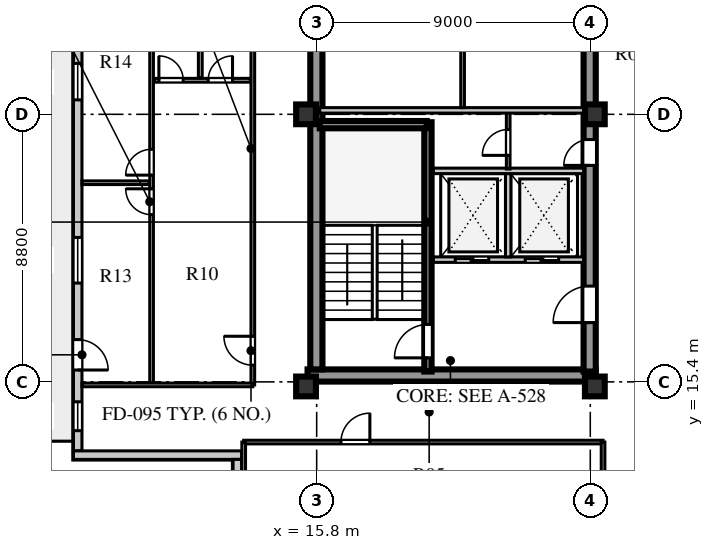
"""IFC4 building model, lengths in metres.
Left out: names, types, materials, properties, quantities, classifications, styles, units other than length and angle.
Written with IfcOpenShell. Run it as: python <this file> out.ifc"""

import sys

from ifc_helpers import new_model, si_unit, direction, frame, frame_2d, origin, origin_2d, place, context, subcontext, project, spatial, rectangle, extrude, element, fill, save


model = new_model("IFC4")
c1 = context("Model", 3, precision=1e-05, world=origin(), true_north=direction((0.0, 1.0)))
c2 = subcontext(c1, "Body", "Model", "MODEL_VIEW")
j1 = project(units=[si_unit("LENGTHUNIT", "METRE"), si_unit("PLANEANGLEUNIT", "RADIAN")], contexts=[c1])
p1 = place(None, origin())
s1 = spatial("IfcSite", under=j1, at=p1, CompositionType="ELEMENT")
p2 = place(p1, origin())
s2 = spatial("IfcBuilding", under=s1, at=p2, CompositionType="ELEMENT")
p3 = place(p2, frame((0.0, 0.0, 214.1)))
s3 = spatial("IfcBuildingStorey", under=s2, at=p3, CompositionType="ELEMENT", Elevation=214.1)
p4 = place(p3, frame((15.5, 15.61, 0.0), z_axis=(0.0, 0.0, 1.0), x_axis=(1.0, 0.0, 0.0)))
e1 = element("IfcWall", 1, at=p4, inside=s3, PredefinedType="SHEAR", context=c2, shape_type="SweptSolid", body=[
    extrude(rectangle(XDim=9.48, YDim=0.4, at=frame_2d((4.74, 0.0))), origin(), (0.0, 0.0, 1.0), 3.66),
])
p5 = place(p3, frame((15.79, 15.81, 0.0), z_axis=(0.0, 0.0, 1.0), x_axis=(0.0, 1.0, 0.0)))
e2 = element("IfcWall", 2, at=p5, inside=s3, PredefinedType="SHEAR", context=c2, shape_type="SweptSolid", body=[
    extrude(rectangle(XDim=25.63, YDim=0.4, at=frame_2d((12.815, 0.0))), origin(), (0.0, 0.0, 1.0), 3.66),
])
p6 = place(p3, frame((24.78, 15.74, 0.0), z_axis=(0.0, 0.0, 1.0), x_axis=(0.0, 1.0, 0.0)))
e3 = element("IfcWall", 3, at=p6, inside=s3, PredefinedType="SHEAR", context=c2, shape_type="SweptSolid", body=[
    extrude(rectangle(XDim=25.76, YDim=0.4, at=frame_2d((12.88, 0.0))), origin(), (0.0, 0.0, 1.0), 3.66),
])
p7 = place(p6, frame((1.61, 0.0, 0.0)))
e4 = element("IfcOpeningElement", 4, at=p7, cuts=e3, PredefinedType="OPENING", context=c2, shape_type="SweptSolid", body=[
    extrude(rectangle(XDim=1.2, YDim=2.1, at=frame_2d((0.6, 1.05))), frame((0.0, 0.21, 0.0), z_axis=(0.0, -1.0, 0.0), x_axis=(1.0, 0.0, 0.0)), (0.0, 0.0, 1.0), 0.42),
])
p8 = place(p6, frame((6.78, 0.0, 0.0)))
e5 = element("IfcOpeningElement", 5, at=p8, cuts=e3, PredefinedType="OPENING", context=c2, shape_type="SweptSolid", body=[
    extrude(rectangle(XDim=0.85, YDim=2.06, at=frame_2d((0.425, 1.03))), frame((0.0, 0.21, 0.0), z_axis=(0.0, -1.0, 0.0), x_axis=(1.0, 0.0, 0.0)), (0.0, 0.0, 1.0), 0.42),
])
p9 = place(p6, frame((12.11, 0.0, 0.0)))
e6 = element("IfcOpeningElement", 6, at=p9, cuts=e3, PredefinedType="OPENING", context=c2, shape_type="SweptSolid", body=[
    extrude(rectangle(XDim=1.5, YDim=2.12, at=frame_2d((0.75, 1.06))), frame((0.0, 0.21, 0.0), z_axis=(0.0, -1.0, 0.0), x_axis=(1.0, 0.0, 0.0)), (0.0, 0.0, 1.0), 0.42),
])
p10 = place(p6, frame((20.11, 0.0, 0.0)))
e7 = element("IfcOpeningElement", 7, at=p10, cuts=e3, PredefinedType="OPENING", context=c2, shape_type="SweptSolid", body=[
    extrude(rectangle(XDim=1.2, YDim=2.12, at=frame_2d((0.6, 1.06))), frame((0.0, 0.21, 0.0), z_axis=(0.0, -1.0, 0.0), x_axis=(1.0, 0.0, 0.0)), (0.0, 0.0, 1.0), 0.42),
])
p11 = place(p6, frame((24.01, 0.0, 0.0)))
e8 = element("IfcOpeningElement", 8, at=p11, cuts=e3, PredefinedType="OPENING", context=c2, shape_type="SweptSolid", body=[
    extrude(rectangle(XDim=0.95, YDim=2.1, at=frame_2d((0.475, 1.05))), frame((0.0, 0.21, 0.0), z_axis=(0.0, -1.0, 0.0), x_axis=(1.0, 0.0, 0.0)), (0.0, 0.0, 1.0), 0.42),
])
for number, where, z_axis, x_axis in (
    (9, (15.45, 15.25, 0.0), (0.0, 0.0, 1.0), (1.0, 0.0, 0.0)),
    (10, (15.45, 24.2, 0.0), (0.0, 0.0, 1.0), (1.0, 0.0, 0.0)),
    (11, (24.95, 15.25, 0.0), (0.0, 0.0, 1.0), (1.0, 0.0, 0.0)),
    (12, (24.95, 24.2, 0.0), (0.0, 0.0, 1.0), (1.0, 0.0, 0.0)),
):
    element("IfcColumn", number, at=place(p3, frame(where, z_axis=z_axis, x_axis=x_axis)), inside=s3, PredefinedType="COLUMN", context=c2, shape_type="SweptSolid", body=[
        extrude(rectangle(XDim=0.65, YDim=0.65, at=origin_2d()), origin(), (0.0, 0.0, 1.0), 3.66),
    ])
p12 = place(p3, frame((7.94, 44.07, 0.0), z_axis=(0.0, 0.0, 1.0), x_axis=(0.0, -1.0, 0.0)))
e13 = element("IfcWall", 13, at=p12, inside=s3, PredefinedType="STANDARD", context=c2, shape_type="SweptSolid", body=[
    extrude(rectangle(XDim=30.94, YDim=0.28, at=frame_2d((15.47, 0.0))), origin(), (0.0, 0.0, 1.0), 3.66),
])
p13 = place(p12, frame((29.325, 0.0, 0.8)))
e14 = element("IfcOpeningElement", 14, at=p13, cuts=e13, PredefinedType="OPENING", context=c2, shape_type="SweptSolid", body=[
    extrude(rectangle(XDim=0.95, YDim=1.65, at=frame_2d((0.475, 0.825))), frame((0.0, 0.15, 0.0), z_axis=(0.0, -1.0, 0.0), x_axis=(1.0, 0.0, 0.0)), (0.0, 0.0, 1.0), 0.3),
])
p14 = place(p12, frame((27.28, 0.0, 0.0)))
e15 = element("IfcOpeningElement", 15, at=p14, cuts=e13, PredefinedType="OPENING", context=c2, shape_type="SweptSolid", body=[
    extrude(rectangle(XDim=1.0, YDim=2.05, at=frame_2d((0.5, 1.025))), frame((0.0, 0.15, 0.0), z_axis=(0.0, -1.0, 0.0), x_axis=(1.0, 0.0, 0.0)), (0.0, 0.0, 1.0), 0.3),
])
p15 = place(p12, frame((23.92, 0.0, 0.8)))
e16 = element("IfcOpeningElement", 16, at=p15, cuts=e13, PredefinedType="OPENING", context=c2, shape_type="SweptSolid", body=[
    extrude(rectangle(XDim=1.5, YDim=2.0, at=frame_2d((0.75, 1.0))), frame((0.0, 0.15, 0.0), z_axis=(0.0, -1.0, 0.0), x_axis=(1.0, 0.0, 0.0)), (0.0, 0.0, 1.0), 0.3),
])
p16 = place(p12, frame((18.195, 0.0, 0.8)))
e17 = element("IfcOpeningElement", 17, at=p16, cuts=e13, PredefinedType="OPENING", context=c2, shape_type="SweptSolid", body=[
    extrude(rectangle(XDim=1.2, YDim=1.75, at=frame_2d((0.6, 0.875))), frame((0.0, 0.15, 0.0), z_axis=(0.0, -1.0, 0.0), x_axis=(1.0, 0.0, 0.0)), (0.0, 0.0, 1.0), 0.3),
])
p17 = place(p12, frame((7.62, 0.0, 0.8)))
e18 = element("IfcOpeningElement", 18, at=p17, cuts=e13, PredefinedType="OPENING", context=c2, shape_type="SweptSolid", body=[
    extrude(rectangle(XDim=2.4, YDim=2.05, at=frame_2d((1.2, 1.025))), frame((0.0, 0.15, 0.0), z_axis=(0.0, -1.0, 0.0), x_axis=(1.0, 0.0, 0.0)), (0.0, 0.0, 1.0), 0.3),
])
p18 = place(p12, frame((0.665, 0.0, 0.8)))
e19 = element("IfcOpeningElement", 19, at=p18, cuts=e13, PredefinedType="OPENING", context=c2, shape_type="SweptSolid", body=[
    extrude(rectangle(XDim=0.95, YDim=1.65, at=frame_2d((0.475, 0.825))), frame((0.0, 0.15, 0.0), z_axis=(0.0, -1.0, 0.0), x_axis=(1.0, 0.0, 0.0)), (0.0, 0.0, 1.0), 0.3),
])
p19 = place(p3, frame((7.8, 12.99, 0.0), z_axis=(0.0, 0.0, 1.0), x_axis=(1.0, 0.0, 0.0)))
e20 = element("IfcWall", 20, at=p19, inside=s3, PredefinedType="STANDARD", context=c2, shape_type="SweptSolid", body=[
    extrude(rectangle(XDim=5.53, YDim=0.28, at=frame_2d((2.765, 0.0))), origin(), (0.0, 0.0, 1.0), 3.66),
])
p20 = place(p3, frame((13.19, 12.85, 0.0), z_axis=(0.0, 0.0, 1.0), x_axis=(0.0, -1.0, 0.0)))
e21 = element("IfcWall", 21, at=p20, inside=s3, PredefinedType="STANDARD", context=c2, shape_type="SweptSolid", body=[
    extrude(rectangle(XDim=4.97, YDim=0.28, at=frame_2d((2.485, 0.0))), origin(), (0.0, 0.0, 1.0), 3.66),
])
p21 = place(p3, frame((19.46, 15.74, 0.0), z_axis=(0.0, 0.0, 1.0), x_axis=(0.0, 1.0, 0.0)))
e22 = element("IfcWall", 22, at=p21, inside=s3, PredefinedType="SHEAR", context=c2, shape_type="SweptSolid", body=[
    extrude(rectangle(XDim=8.2, YDim=0.24, at=frame_2d((4.1, 0.0))), origin(), (0.0, 0.0, 1.0), 3.9),
])
p22 = place(p21, frame((0.45, 0.0, 0.0)))
e23 = element("IfcOpeningElement", 23, at=p22, cuts=e22, PredefinedType="OPENING", context=c2, shape_type="SweptSolid", body=[
    extrude(rectangle(XDim=1.1, YDim=2.1, at=frame_2d((0.55, 1.05))), frame((0.0, 0.13, 0.0), z_axis=(0.0, -1.0, 0.0), x_axis=(1.0, 0.0, 0.0)), (0.0, 0.0, 1.0), 0.26),
])
p23 = place(p3, frame((15.9, 23.86, 0.0), z_axis=(0.0, 0.0, 1.0), x_axis=(1.0, 0.0, 0.0)))
e24 = element("IfcWall", 24, at=p23, inside=s3, PredefinedType="SHEAR", context=c2, shape_type="SweptSolid", body=[
    extrude(rectangle(XDim=3.52, YDim=0.24, at=frame_2d((1.76, 0.0))), origin(), (0.0, 0.0, 1.0), 3.9),
])
p24 = place(p3, frame((19.64, 19.42, 0.0), z_axis=(0.0, 0.0, 1.0), x_axis=(1.0, 0.0, 0.0)))
e25 = element("IfcWall", 25, at=p24, inside=s3, PredefinedType="SOLIDWALL", context=c2, shape_type="SweptSolid", body=[
    extrude(rectangle(XDim=4.94, YDim=0.18, at=frame_2d((2.47, 0.0))), origin(), (0.0, 0.0, 1.0), 3.66),
])
p25 = place(p24, frame((0.72, 0.0, 0.0)))
e26 = element("IfcOpeningElement", 26, at=p25, cuts=e25, PredefinedType="OPENING", context=c2, shape_type="SweptSolid", body=[
    extrude(rectangle(XDim=1.1, YDim=2.1, at=frame_2d((0.55, 1.05))), frame((0.0, 0.1, 0.0), z_axis=(0.0, -1.0, 0.0), x_axis=(1.0, 0.0, 0.0)), (0.0, 0.0, 1.0), 0.2),
])
p26 = place(p24, frame((3.02, 0.0, 0.0)))
e27 = element("IfcOpeningElement", 27, at=p26, cuts=e25, PredefinedType="OPENING", context=c2, shape_type="SweptSolid", body=[
    extrude(rectangle(XDim=1.1, YDim=2.1, at=frame_2d((0.55, 1.05))), frame((0.0, 0.1, 0.0), z_axis=(0.0, -1.0, 0.0), x_axis=(1.0, 0.0, 0.0)), (0.0, 0.0, 1.0), 0.2),
])
p27 = place(p3, frame((22.1, 19.51, 0.0), z_axis=(0.0, 0.0, 1.0), x_axis=(0.0, 1.0, 0.0)))
e28 = element("IfcWall", 28, at=p27, inside=s3, PredefinedType="SOLIDWALL", context=c2, shape_type="SweptSolid", body=[
    extrude(rectangle(XDim=2.74, YDim=0.18, at=frame_2d((1.37, 0.0))), origin(), (0.0, 0.0, 1.0), 3.66),
])
p28 = place(p3, frame((19.64, 22.34, 0.0), z_axis=(0.0, 0.0, 1.0), x_axis=(1.0, 0.0, 0.0)))
e29 = element("IfcWall", 29, at=p28, inside=s3, PredefinedType="SOLIDWALL", context=c2, shape_type="SweptSolid", body=[
    extrude(rectangle(XDim=4.94, YDim=0.18, at=frame_2d((2.47, 0.0))), origin(), (0.0, 0.0, 1.0), 3.66),
])
p29 = place(p3, frame((22.1, 22.4, 0.0), z_axis=(0.0, 0.0, 1.0), x_axis=(0.0, 1.0, 0.0)))
e30 = element("IfcWall", 30, at=p29, inside=s3, PredefinedType="PARTITIONING", context=c2, shape_type="SweptSolid", body=[
    extrude(rectangle(XDim=1.88, YDim=0.12, at=frame_2d((0.94, 0.0))), origin(), (0.0, 0.0, 1.0), 3.66),
])
p30 = place(p29, frame((0.45, 0.0, 0.0)))
e31 = element("IfcOpeningElement", 31, at=p30, cuts=e30, PredefinedType="OPENING", context=c2, shape_type="SweptSolid", body=[
    extrude(rectangle(XDim=0.85, YDim=2.06, at=frame_2d((0.425, 1.03))), frame((0.0, 0.07, 0.0), z_axis=(0.0, -1.0, 0.0), x_axis=(1.0, 0.0, 0.0)), (0.0, 0.0, 1.0), 0.14),
])
p31 = place(p3, frame((15.9, 24.33, 0.0), z_axis=(0.0, 0.0, 1.0), x_axis=(1.0, 0.0, 0.0)))
e32 = element("IfcWall", 32, at=p31, inside=s3, PredefinedType="SOLIDWALL", context=c2, shape_type="SweptSolid", body=[
    extrude(rectangle(XDim=8.68, YDim=0.18, at=frame_2d((4.34, 0.0))), origin(), (0.0, 0.0, 1.0), 3.06),
])
p32 = place(p3, frame((20.6, 24.42, 0.0), z_axis=(0.0, 0.0, 1.0), x_axis=(0.0, 1.0, 0.0)))
e33 = element("IfcWall", 33, at=p32, inside=s3, PredefinedType="PARTITIONING", context=c2, shape_type="SweptSolid", body=[
    extrude(rectangle(XDim=2.02, YDim=0.12, at=frame_2d((1.01, 0.0))), origin(), (0.0, 0.0, 1.0), 3.66),
])
p33 = place(p3, frame((13.4, 13.42, 0.0), z_axis=(0.0, 0.0, 1.0), x_axis=(1.0, 0.0, 0.0)))
e34 = element("IfcWall", 34, at=p33, inside=s3, PredefinedType="PARTITIONING", context=c2, shape_type="SweptSolid", body=[
    extrude(rectangle(XDim=11.82, YDim=0.12, at=frame_2d((5.91, 0.0))), origin(), (0.0, 0.0, 1.0), 3.66),
])
p34 = place(p33, frame((3.2, 0.0, 0.0)))
e35 = element("IfcOpeningElement", 35, at=p34, cuts=e34, PredefinedType="OPENING", context=c2, shape_type="SweptSolid", body=[
    extrude(rectangle(XDim=0.95, YDim=2.08, at=frame_2d((0.475, 1.04))), frame((0.0, 0.07, 0.0), z_axis=(0.0, -1.0, 0.0), x_axis=(1.0, 0.0, 0.0)), (0.0, 0.0, 1.0), 0.14),
])
p35 = place(p3, frame((13.4, 7.88, 0.0), z_axis=(0.0, 0.0, 1.0), x_axis=(0.0, 1.0, 0.0)))
e36 = element("IfcWall", 36, at=p35, inside=s3, PredefinedType="PARTITIONING", context=c2, shape_type="SweptSolid", body=[
    extrude(rectangle(XDim=5.54, YDim=0.12, at=frame_2d((2.77, 0.0))), origin(), (0.0, 0.0, 1.0), 3.66),
])
p36 = place(p3, frame((25.22, 7.88, 0.0), z_axis=(0.0, 0.0, 1.0), x_axis=(0.0, 1.0, 0.0)))
e37 = element("IfcWall", 37, at=p36, inside=s3, PredefinedType="PARTITIONING", context=c2, shape_type="SweptSolid", body=[
    extrude(rectangle(XDim=5.54, YDim=0.12, at=frame_2d((2.77, 0.0))), origin(), (0.0, 0.0, 1.0), 3.21),
])
p37 = place(p3, frame((13.7, 15.3, 0.0), z_axis=(0.0, 0.0, 1.0), x_axis=(0.0, 1.0, 0.0)))
e38 = element("IfcWall", 38, at=p37, inside=s3, PredefinedType="PARTITIONING", context=c2, shape_type="SweptSolid", body=[
    extrude(rectangle(XDim=26.6, YDim=0.12, at=frame_2d((13.3, 0.0))), origin(), (0.0, 0.0, 1.0), 3.66),
])
p38 = place(p37, frame((0.65, 0.0, 0.0)))
e39 = element("IfcOpeningElement", 39, at=p38, cuts=e38, PredefinedType="OPENING", context=c2, shape_type="SweptSolid", body=[
    extrude(rectangle(XDim=0.95, YDim=2.1, at=frame_2d((0.475, 1.05))), frame((0.0, 0.07, 0.0), z_axis=(0.0, -1.0, 0.0), x_axis=(1.0, 0.0, 0.0)), (0.0, 0.0, 1.0), 0.14),
])
p39 = place(p37, frame((13.95, 0.0, 0.0)))
e40 = element("IfcOpeningElement", 40, at=p39, cuts=e38, PredefinedType="OPENING", context=c2, shape_type="SweptSolid", body=[
    extrude(rectangle(XDim=0.95, YDim=2.1, at=frame_2d((0.475, 1.05))), frame((0.0, 0.07, 0.0), z_axis=(0.0, -1.0, 0.0), x_axis=(1.0, 0.0, 0.0)), (0.0, 0.0, 1.0), 0.14),
])
p40 = place(p3, frame((8.08, 15.3, 0.0), z_axis=(0.0, 0.0, 1.0), x_axis=(1.0, 0.0, 0.0)))
e41 = element("IfcWall", 41, at=p40, inside=s3, PredefinedType="PARTITIONING", context=c2, shape_type="SweptSolid", body=[
    extrude(rectangle(XDim=5.62, YDim=0.12, at=frame_2d((2.81, 0.0))), origin(), (0.0, 0.0, 1.0), 3.21),
])
p41 = place(p3, frame((10.37, 15.38, 0.0), z_axis=(0.0, 0.0, 1.0), x_axis=(0.0, 1.0, 0.0)))
e42 = element("IfcWall", 42, at=p41, inside=s3, PredefinedType="PARTITIONING", context=c2, shape_type="SweptSolid", body=[
    extrude(rectangle(XDim=13.14, YDim=0.12, at=frame_2d((6.57, 0.0))), origin(), (0.0, 0.0, 1.0), 3.66),
])
p42 = place(p41, frame((5.52, 0.0, 0.0)))
e43 = element("IfcOpeningElement", 43, at=p42, cuts=e42, PredefinedType="OPENING", context=c2, shape_type="SweptSolid", body=[
    extrude(rectangle(XDim=0.85, YDim=2.08, at=frame_2d((0.425, 1.04))), frame((0.0, 0.07, 0.0), z_axis=(0.0, -1.0, 0.0), x_axis=(1.0, 0.0, 0.0)), (0.0, 0.0, 1.0), 0.14),
])
p43 = place(p41, frame((6.82, 0.0, 0.0)))
e44 = element("IfcOpeningElement", 44, at=p43, cuts=e42, PredefinedType="OPENING", context=c2, shape_type="SweptSolid", body=[
    extrude(rectangle(XDim=0.85, YDim=2.08, at=frame_2d((0.425, 1.04))), frame((0.0, 0.07, 0.0), z_axis=(0.0, -1.0, 0.0), x_axis=(1.0, 0.0, 0.0)), (0.0, 0.0, 1.0), 0.14),
])
p44 = place(p3, frame((10.45, 25.32, 0.0), z_axis=(0.0, 0.0, 1.0), x_axis=(1.0, 0.0, 0.0)))
e45 = element("IfcWall", 45, at=p44, inside=s3, PredefinedType="PLUMBINGWALL", context=c2, shape_type="SweptSolid", body=[
    extrude(rectangle(XDim=3.17, YDim=0.125, at=frame_2d((1.585, 0.0))), origin(), (0.0, 0.0, 1.0), 3.66),
])
p45 = place(p44, frame((0.16, 0.0, 0.0)))
e46 = element("IfcOpeningElement", 46, at=p45, cuts=e45, PredefinedType="OPENING", context=c2, shape_type="SweptSolid", body=[
    extrude(rectangle(XDim=0.8, YDim=2.05, at=frame_2d((0.4, 1.025))), frame((0.0, 0.073, 0.0), z_axis=(0.0, -1.0, 0.0), x_axis=(1.0, 0.0, 0.0)), (0.0, 0.0, 1.0), 0.145),
])
p46 = place(p44, frame((1.782, 0.0, 0.0)))
e47 = element("IfcOpeningElement", 47, at=p46, cuts=e45, PredefinedType="OPENING", context=c2, shape_type="SweptSolid", body=[
    extrude(rectangle(XDim=0.8, YDim=2.05, at=frame_2d((0.4, 1.025))), frame((0.0, 0.073, 0.0), z_axis=(0.0, -1.0, 0.0), x_axis=(1.0, 0.0, 0.0)), (0.0, 0.0, 1.0), 0.145),
])
p47 = place(p3, frame((11.972, 25.4, 0.0), z_axis=(0.0, 0.0, 1.0), x_axis=(0.0, 1.0, 0.0)))
e48 = element("IfcWall", 48, at=p47, inside=s3, PredefinedType="PLUMBINGWALL", context=c2, shape_type="SweptSolid", body=[
    extrude(rectangle(XDim=3.12, YDim=0.125, at=frame_2d((1.56, 0.0))), origin(), (0.0, 0.0, 1.0), 3.66),
])
p48 = place(p3, frame((8.08, 21.95, 0.0), z_axis=(0.0, 0.0, 1.0), x_axis=(1.0, 0.0, 0.0)))
e49 = element("IfcWall", 49, at=p48, inside=s3, PredefinedType="PARTITIONING", context=c2, shape_type="SweptSolid", body=[
    extrude(rectangle(XDim=2.21, YDim=0.12, at=frame_2d((1.105, 0.0))), origin(), (0.0, 0.0, 1.0), 3.66),
])
p49 = place(p13, origin())
e50 = element("IfcWindow", 50, at=p49, inside=s3, PartitioningType="SINGLE_PANEL", PredefinedType="WINDOW", context=c2, shape_type="SweptSolid", body=[
    extrude(rectangle(XDim=0.95, YDim=1.65, at=frame_2d((0.475, 0.825))), frame((0.0, 0.03, 0.0), z_axis=(0.0, -1.0, 0.0), x_axis=(1.0, 0.0, 0.0)), (0.0, 0.0, 1.0), 0.06),
])
fill(e14, e50)
p50 = place(p14, frame((1.0, 0.0, 0.0), z_axis=(0.0, 0.0, 1.0), x_axis=(-1.0, 0.0, 0.0)))
e51 = element("IfcDoor", 51, at=p50, inside=s3, OperationType="SINGLE_SWING_LEFT", PredefinedType="DOOR", context=c2, shape_type="SweptSolid", body=[
    extrude(rectangle(XDim=1.0, YDim=2.05, at=frame_2d((0.5, 1.025))), frame((0.0, 0.025, 0.0), z_axis=(0.0, -1.0, 0.0), x_axis=(1.0, 0.0, 0.0)), (0.0, 0.0, 1.0), 0.05),
])
fill(e15, e51)
p51 = place(p15, origin())
e52 = element("IfcWindow", 52, at=p51, inside=s3, PartitioningType="SINGLE_PANEL", PredefinedType="WINDOW", context=c2, shape_type="SweptSolid", body=[
    extrude(rectangle(XDim=1.5, YDim=2.0, at=frame_2d((0.75, 1.0))), frame((0.0, 0.03, 0.0), z_axis=(0.0, -1.0, 0.0), x_axis=(1.0, 0.0, 0.0)), (0.0, 0.0, 1.0), 0.06),
])
fill(e16, e52)
p52 = place(p16, origin())
e53 = element("IfcWindow", 53, at=p52, inside=s3, PartitioningType="SINGLE_PANEL", PredefinedType="WINDOW", context=c2, shape_type="SweptSolid", body=[
    extrude(rectangle(XDim=1.2, YDim=1.75, at=frame_2d((0.6, 0.875))), frame((0.0, 0.03, 0.0), z_axis=(0.0, -1.0, 0.0), x_axis=(1.0, 0.0, 0.0)), (0.0, 0.0, 1.0), 0.06),
])
fill(e17, e53)
p53 = place(p22, origin())
e54 = element("IfcDoor", 54, at=p53, inside=s3, OperationType="SINGLE_SWING_LEFT", PredefinedType="DOOR", context=c2, shape_type="SweptSolid", body=[
    extrude(rectangle(XDim=1.1, YDim=2.1, at=frame_2d((0.55, 1.05))), frame((0.0, 0.025, 0.0), z_axis=(0.0, -1.0, 0.0), x_axis=(1.0, 0.0, 0.0)), (0.0, 0.0, 1.0), 0.05),
])
fill(e23, e54)
p54 = place(p25, origin())
e55 = element("IfcDoor", 55, at=p54, inside=s3, OperationType="DOUBLE_DOOR_SLIDING", PredefinedType="DOOR", context=c2, shape_type="SweptSolid", body=[
    extrude(rectangle(XDim=1.1, YDim=2.1, at=frame_2d((0.55, 1.05))), frame((0.0, 0.025, 0.0), z_axis=(0.0, -1.0, 0.0), x_axis=(1.0, 0.0, 0.0)), (0.0, 0.0, 1.0), 0.05),
])
fill(e26, e55)
p55 = place(p26, origin())
e56 = element("IfcDoor", 56, at=p55, inside=s3, OperationType="DOUBLE_DOOR_SLIDING", PredefinedType="DOOR", context=c2, shape_type="SweptSolid", body=[
    extrude(rectangle(XDim=1.1, YDim=2.1, at=frame_2d((0.55, 1.05))), frame((0.0, 0.025, 0.0), z_axis=(0.0, -1.0, 0.0), x_axis=(1.0, 0.0, 0.0)), (0.0, 0.0, 1.0), 0.05),
])
fill(e27, e56)
p56 = place(p7, frame((1.2, 0.0, 0.0), z_axis=(0.0, 0.0, 1.0), x_axis=(-1.0, 0.0, 0.0)))
e57 = element("IfcDoor", 57, at=p56, inside=s3, OperationType="SINGLE_SWING_RIGHT", PredefinedType="DOOR", context=c2, shape_type="SweptSolid", body=[
    extrude(rectangle(XDim=1.2, YDim=2.1, at=frame_2d((0.6, 1.05))), frame((0.0, 0.025, 0.0), z_axis=(0.0, -1.0, 0.0), x_axis=(1.0, 0.0, 0.0)), (0.0, 0.0, 1.0), 0.05),
])
fill(e4, e57)
p57 = place(p30, origin())
e58 = element("IfcDoor", 58, at=p57, inside=s3, OperationType="SINGLE_SWING_LEFT", PredefinedType="DOOR", context=c2, shape_type="SweptSolid", body=[
    extrude(rectangle(XDim=0.85, YDim=2.06, at=frame_2d((0.425, 1.03))), frame((0.0, 0.025, 0.0), z_axis=(0.0, -1.0, 0.0), x_axis=(1.0, 0.0, 0.0)), (0.0, 0.0, 1.0), 0.05),
])
fill(e31, e58)
p58 = place(p8, frame((0.85, 0.0, 0.0), z_axis=(0.0, 0.0, 1.0), x_axis=(-1.0, 0.0, 0.0)))
e59 = element("IfcDoor", 59, at=p58, inside=s3, OperationType="SINGLE_SWING_RIGHT", PredefinedType="DOOR", context=c2, shape_type="SweptSolid", body=[
    extrude(rectangle(XDim=0.85, YDim=2.06, at=frame_2d((0.425, 1.03))), frame((0.0, 0.025, 0.0), z_axis=(0.0, -1.0, 0.0), x_axis=(1.0, 0.0, 0.0)), (0.0, 0.0, 1.0), 0.05),
])
fill(e5, e59)
p59 = place(p34, frame((0.95, 0.0, 0.0), z_axis=(0.0, 0.0, 1.0), x_axis=(-1.0, 0.0, 0.0)))
e60 = element("IfcDoor", 60, at=p59, inside=s3, OperationType="SINGLE_SWING_LEFT", PredefinedType="DOOR", context=c2, shape_type="SweptSolid", body=[
    extrude(rectangle(XDim=0.95, YDim=2.08, at=frame_2d((0.475, 1.04))), frame((0.0, 0.025, 0.0), z_axis=(0.0, -1.0, 0.0), x_axis=(1.0, 0.0, 0.0)), (0.0, 0.0, 1.0), 0.05),
])
fill(e35, e60)
p60 = place(p45, origin())
e61 = element("IfcDoor", 61, at=p60, inside=s3, OperationType="SINGLE_SWING_LEFT", PredefinedType="DOOR", context=c2, shape_type="SweptSolid", body=[
    extrude(rectangle(XDim=0.8, YDim=2.05, at=frame_2d((0.4, 1.025))), frame((0.0, 0.025, 0.0), z_axis=(0.0, -1.0, 0.0), x_axis=(1.0, 0.0, 0.0)), (0.0, 0.0, 1.0), 0.05),
])
fill(e46, e61)
p61 = place(p46, origin())
e62 = element("IfcDoor", 62, at=p61, inside=s3, OperationType="SINGLE_SWING_RIGHT", PredefinedType="DOOR", context=c2, shape_type="SweptSolid", body=[
    extrude(rectangle(XDim=0.8, YDim=2.05, at=frame_2d((0.4, 1.025))), frame((0.0, 0.025, 0.0), z_axis=(0.0, -1.0, 0.0), x_axis=(1.0, 0.0, 0.0)), (0.0, 0.0, 1.0), 0.05),
])
fill(e47, e62)
p62 = place(p42, frame((0.85, 0.0, 0.0), z_axis=(0.0, 0.0, 1.0), x_axis=(-1.0, 0.0, 0.0)))
e63 = element("IfcDoor", 63, at=p62, inside=s3, OperationType="SINGLE_SWING_LEFT", PredefinedType="DOOR", context=c2, shape_type="SweptSolid", body=[
    extrude(rectangle(XDim=0.85, YDim=2.08, at=frame_2d((0.425, 1.04))), frame((0.0, 0.025, 0.0), z_axis=(0.0, -1.0, 0.0), x_axis=(1.0, 0.0, 0.0)), (0.0, 0.0, 1.0), 0.05),
])
fill(e43, e63)
p63 = place(p43, frame((0.85, 0.0, 0.0), z_axis=(0.0, 0.0, 1.0), x_axis=(-1.0, 0.0, 0.0)))
e64 = element("IfcDoor", 64, at=p63, inside=s3, OperationType="SINGLE_SWING_RIGHT", PredefinedType="DOOR", context=c2, shape_type="SweptSolid", body=[
    extrude(rectangle(XDim=0.85, YDim=2.08, at=frame_2d((0.425, 1.04))), frame((0.0, 0.025, 0.0), z_axis=(0.0, -1.0, 0.0), x_axis=(1.0, 0.0, 0.0)), (0.0, 0.0, 1.0), 0.05),
])
fill(e44, e64)
p64 = place(p38, frame((0.95, 0.0, 0.0), z_axis=(0.0, 0.0, 1.0), x_axis=(-1.0, 0.0, 0.0)))
e65 = element("IfcDoor", 65, at=p64, inside=s3, OperationType="SINGLE_SWING_LEFT", PredefinedType="DOOR", context=c2, shape_type="SweptSolid", body=[
    extrude(rectangle(XDim=0.95, YDim=2.1, at=frame_2d((0.475, 1.05))), frame((0.0, 0.025, 0.0), z_axis=(0.0, -1.0, 0.0), x_axis=(1.0, 0.0, 0.0)), (0.0, 0.0, 1.0), 0.05),
])
fill(e39, e65)
save(model, sys.argv[1])
